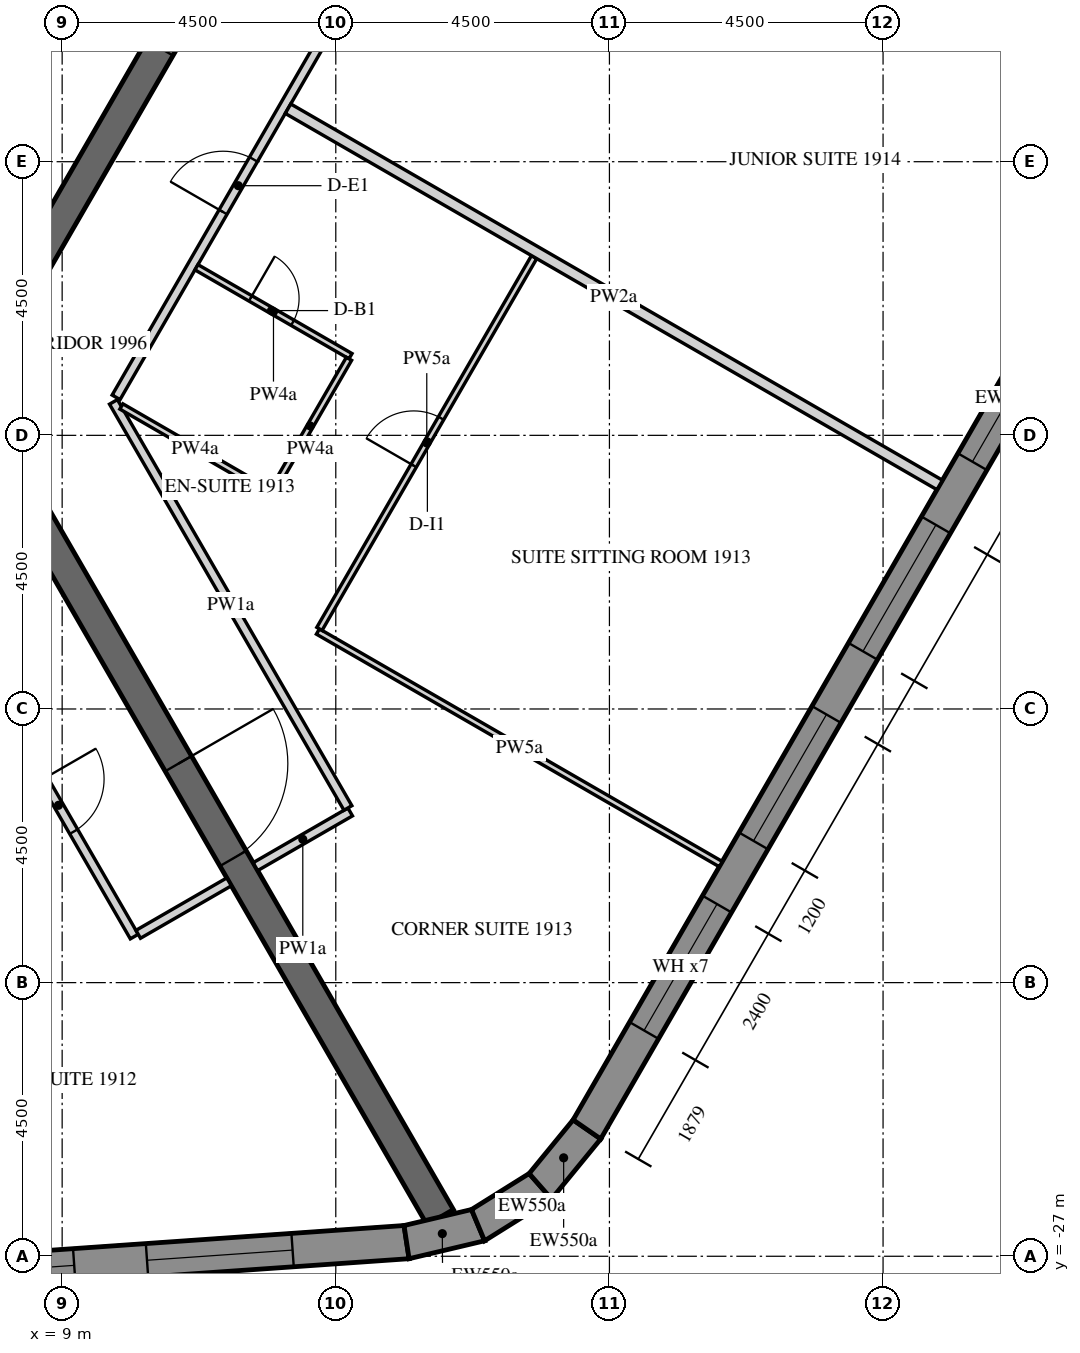
"""IFC4 building model, lengths in metres.
Left out: names, types, materials, properties, quantities, classifications, styles, units other than length and angle.
Written with IfcOpenShell. Run it as: python <this file> out.ifc"""

import sys

from ifc_helpers import new_model, si_unit, direction, frame, frame_2d, origin, place, context, subcontext, project, spatial, polyline, rectangle, outline, extrude, element, fill, save


model = new_model("IFC4")
c1 = context("Model", 3, precision=1e-05, world=origin(), true_north=direction((0.0, 1.0)))
c2 = subcontext(c1, "Body", "Model", "MODEL_VIEW")
j1 = project(units=[si_unit("LENGTHUNIT", "METRE"), si_unit("PLANEANGLEUNIT", "RADIAN")], contexts=[c1])
p1 = place(None, origin())
s1 = spatial("IfcSite", under=j1, at=p1, CompositionType="ELEMENT")
p2 = place(p1, origin())
s2 = spatial("IfcBuilding", under=s1, at=p2, CompositionType="ELEMENT")
p3 = place(p2, frame((0.0, 0.0, 246.3)))
s3 = spatial("IfcBuildingStorey", under=s2, at=p3, CompositionType="ELEMENT", Elevation=246.3)
p4 = place(p3, frame((-13.026, -28.704, -0.15), z_axis=(0.0, 0.0, 1.0), x_axis=(0.99756406806, 0.069756219185, 0.0)))
e1 = element("IfcWall", 1, at=p4, inside=s3, PredefinedType="SOLIDWALL", context=c2, shape_type="SweptSolid", body=[
    extrude(outline(polyline([(-0.026, -0.275), (27.78, -0.275), (27.735, 0.275), (0.026, 0.275), (-0.026, -0.275)])), origin(), (0.0, 0.0, 1.0), 3.75),
])
p5 = place(p4, frame((1.879, 0.0, 1.05)))
e2 = element("IfcOpeningElement", 2, at=p5, cuts=e1, PredefinedType="OPENING", context=c2, shape_type="SweptSolid", body=[
    extrude(rectangle(XDim=2.4, YDim=2.4, at=frame_2d((1.2, 1.2))), frame((0.0, 0.285, 0.0), z_axis=(0.0, -1.0, 0.0), x_axis=(1.0, 0.0, 0.0)), (0.0, 0.0, 1.0), 0.57),
])
p6 = place(p4, frame((5.479, 0.0, 1.05)))
e3 = element("IfcOpeningElement", 3, at=p6, cuts=e1, PredefinedType="OPENING", context=c2, shape_type="SweptSolid", body=[
    extrude(rectangle(XDim=2.4, YDim=2.4, at=frame_2d((1.2, 1.2))), frame((0.0, 0.285, 0.0), z_axis=(0.0, -1.0, 0.0), x_axis=(1.0, 0.0, 0.0)), (0.0, 0.0, 1.0), 0.57),
])
p7 = place(p4, frame((9.079, 0.0, 1.05)))
e4 = element("IfcOpeningElement", 4, at=p7, cuts=e1, PredefinedType="OPENING", context=c2, shape_type="SweptSolid", body=[
    extrude(rectangle(XDim=2.4, YDim=2.4, at=frame_2d((1.2, 1.2))), frame((0.0, 0.285, 0.0), z_axis=(0.0, -1.0, 0.0), x_axis=(1.0, 0.0, 0.0)), (0.0, 0.0, 1.0), 0.57),
])
p8 = place(p4, frame((12.679, 0.0, 1.05)))
e5 = element("IfcOpeningElement", 5, at=p8, cuts=e1, PredefinedType="OPENING", context=c2, shape_type="SweptSolid", body=[
    extrude(rectangle(XDim=2.4, YDim=2.4, at=frame_2d((1.2, 1.2))), frame((0.0, 0.285, 0.0), z_axis=(0.0, -1.0, 0.0), x_axis=(1.0, 0.0, 0.0)), (0.0, 0.0, 1.0), 0.57),
])
p9 = place(p4, frame((16.279, 0.0, 1.05)))
e6 = element("IfcOpeningElement", 6, at=p9, cuts=e1, PredefinedType="OPENING", context=c2, shape_type="SweptSolid", body=[
    extrude(rectangle(XDim=2.4, YDim=2.4, at=frame_2d((1.2, 1.2))), frame((0.0, 0.285, 0.0), z_axis=(0.0, -1.0, 0.0), x_axis=(1.0, 0.0, 0.0)), (0.0, 0.0, 1.0), 0.57),
])
p10 = place(p4, frame((19.879, 0.0, 1.05)))
e7 = element("IfcOpeningElement", 7, at=p10, cuts=e1, PredefinedType="OPENING", context=c2, shape_type="SweptSolid", body=[
    extrude(rectangle(XDim=2.4, YDim=2.4, at=frame_2d((1.2, 1.2))), frame((0.0, 0.285, 0.0), z_axis=(0.0, -1.0, 0.0), x_axis=(1.0, 0.0, 0.0)), (0.0, 0.0, 1.0), 0.57),
])
p11 = place(p4, frame((23.479, 0.0, 1.05)))
e8 = element("IfcOpeningElement", 8, at=p11, cuts=e1, PredefinedType="OPENING", context=c2, shape_type="SweptSolid", body=[
    extrude(rectangle(XDim=2.4, YDim=2.4, at=frame_2d((1.2, 1.2))), frame((0.0, 0.285, 0.0), z_axis=(0.0, -1.0, 0.0), x_axis=(1.0, 0.0, 0.0)), (0.0, 0.0, 1.0), 0.57),
])
p12 = place(p3, frame((14.664, -26.767, -0.15), z_axis=(0.0, 0.0, 1.0), x_axis=(0.973063591128, 0.230536868247, 0.0)))
e9 = element("IfcWall", 9, at=p12, inside=s3, PredefinedType="SOLIDWALL", context=c2, shape_type="SweptSolid", body=[
    extrude(outline(polyline([(-0.022, -0.275), (1.253, -0.275), (1.163, 0.275), (0.022, 0.275), (-0.022, -0.275)])), origin(), (0.0, 0.0, 1.0), 3.75),
])
p13 = place(p3, frame((15.84, -26.489, -0.15), z_axis=(0.0, 0.0, 1.0), x_axis=(0.848009655012, 0.52998077796, 0.0)))
e10 = element("IfcWall", 10, at=p13, inside=s3, PredefinedType="SOLIDWALL", context=c2, shape_type="SweptSolid", body=[
    extrude(outline(polyline([(-0.045, -0.275), (1.253, -0.275), (1.163, 0.275), (0.045, 0.275), (-0.045, -0.275)])), origin(), (0.0, 0.0, 1.0), 3.75),
])
p14 = place(p3, frame((16.864, -25.848, -0.15), z_axis=(0.0, 0.0, 1.0), x_axis=(0.633842757806, 0.773461930787, 0.0)))
e11 = element("IfcWall", 11, at=p14, inside=s3, PredefinedType="SOLIDWALL", context=c2, shape_type="SweptSolid", body=[
    extrude(outline(polyline([(-0.045, -0.275), (1.231, -0.275), (1.186, 0.275), (0.045, 0.275), (-0.045, -0.275)])), origin(), (0.0, 0.0, 1.0), 3.75),
])
p15 = place(p3, frame((17.63, -24.914, -0.15), z_axis=(0.0, 0.0, 1.0), x_axis=(0.499998569178, 0.866026229868, 0.0)))
e12 = element("IfcWall", 12, at=p15, inside=s3, PredefinedType="SOLIDWALL", context=c2, shape_type="SweptSolid", body=[
    extrude(outline(polyline([(-0.022, -0.275), (27.783, -0.275), (27.732, 0.275), (0.022, 0.275), (-0.022, -0.275)])), origin(), (0.0, 0.0, 1.0), 3.75),
])
p16 = place(p15, frame((1.879, 0.0, 1.05)))
e13 = element("IfcOpeningElement", 13, at=p16, cuts=e12, PredefinedType="OPENING", context=c2, shape_type="SweptSolid", body=[
    extrude(rectangle(XDim=2.4, YDim=2.4, at=frame_2d((1.2, 1.2))), frame((0.0, 0.285, 0.0), z_axis=(0.0, -1.0, 0.0), x_axis=(1.0, 0.0, 0.0)), (0.0, 0.0, 1.0), 0.57),
])
p17 = place(p15, frame((5.479, 0.0, 1.05)))
e14 = element("IfcOpeningElement", 14, at=p17, cuts=e12, PredefinedType="OPENING", context=c2, shape_type="SweptSolid", body=[
    extrude(rectangle(XDim=2.4, YDim=2.4, at=frame_2d((1.2, 1.2))), frame((0.0, 0.285, 0.0), z_axis=(0.0, -1.0, 0.0), x_axis=(1.0, 0.0, 0.0)), (0.0, 0.0, 1.0), 0.57),
])
p18 = place(p15, frame((9.079, 0.0, 1.05)))
e15 = element("IfcOpeningElement", 15, at=p18, cuts=e12, PredefinedType="OPENING", context=c2, shape_type="SweptSolid", body=[
    extrude(rectangle(XDim=2.4, YDim=2.4, at=frame_2d((1.2, 1.2))), frame((0.0, 0.285, 0.0), z_axis=(0.0, -1.0, 0.0), x_axis=(1.0, 0.0, 0.0)), (0.0, 0.0, 1.0), 0.57),
])
p19 = place(p15, frame((12.679, 0.0, 1.05)))
e16 = element("IfcOpeningElement", 16, at=p19, cuts=e12, PredefinedType="OPENING", context=c2, shape_type="SweptSolid", body=[
    extrude(rectangle(XDim=2.4, YDim=2.4, at=frame_2d((1.2, 1.2))), frame((0.0, 0.285, 0.0), z_axis=(0.0, -1.0, 0.0), x_axis=(1.0, 0.0, 0.0)), (0.0, 0.0, 1.0), 0.57),
])
p20 = place(p15, frame((16.279, 0.0, 1.05)))
e17 = element("IfcOpeningElement", 17, at=p20, cuts=e12, PredefinedType="OPENING", context=c2, shape_type="SweptSolid", body=[
    extrude(rectangle(XDim=2.4, YDim=2.4, at=frame_2d((1.2, 1.2))), frame((0.0, 0.285, 0.0), z_axis=(0.0, -1.0, 0.0), x_axis=(1.0, 0.0, 0.0)), (0.0, 0.0, 1.0), 0.57),
])
p21 = place(p15, frame((19.879, 0.0, 1.05)))
e18 = element("IfcOpeningElement", 18, at=p21, cuts=e12, PredefinedType="OPENING", context=c2, shape_type="SweptSolid", body=[
    extrude(rectangle(XDim=2.4, YDim=2.4, at=frame_2d((1.2, 1.2))), frame((0.0, 0.285, 0.0), z_axis=(0.0, -1.0, 0.0), x_axis=(1.0, 0.0, 0.0)), (0.0, 0.0, 1.0), 0.57),
])
p22 = place(p15, frame((23.479, 0.0, 1.05)))
e19 = element("IfcOpeningElement", 19, at=p22, cuts=e12, PredefinedType="OPENING", context=c2, shape_type="SweptSolid", body=[
    extrude(rectangle(XDim=2.4, YDim=2.4, at=frame_2d((1.2, 1.2))), frame((0.0, 0.285, 0.0), z_axis=(0.0, -1.0, 0.0), x_axis=(1.0, 0.0, 0.0)), (0.0, 0.0, 1.0), 0.57),
])
p23 = place(p3, frame((7.361, -12.75, -0.15), z_axis=(0.0, 0.0, 1.0), x_axis=(0.50000571537, 0.866022103989, 0.0)))
e20 = element("IfcWall", 20, at=p23, inside=s3, PredefinedType="SHEAR", context=c2, shape_type="SweptSolid", body=[
    extrude(outline(polyline([(-0.144, -0.25), (14.867, -0.25), (14.578, 0.25), (0.144, 0.25), (-0.144, -0.25)])), origin(), (0.0, 0.0, 1.0), 3.75),
])
p24 = place(p23, frame((6.49, 0.0, 0.15)))
e21 = element("IfcOpeningElement", 21, at=p24, cuts=e20, PredefinedType="OPENING", context=c2, shape_type="SweptSolid", body=[
    extrude(rectangle(XDim=1.8, YDim=2.4, at=frame_2d((0.9, 1.2))), frame((0.0, 0.26, 0.0), z_axis=(0.0, -1.0, 0.0), x_axis=(1.0, 0.0, 0.0)), (0.0, 0.0, 1.0), 0.52),
])
p25 = place(p3, frame((7.506, -13.0, -0.15), z_axis=(0.0, 0.0, 1.0), x_axis=(0.499988271576, -0.866032175087, 0.0)))
e22 = element("IfcWall", 22, at=p25, inside=s3, PredefinedType="SHEAR", context=c2, shape_type="SweptSolid", body=[
    extrude(rectangle(XDim=15.424, YDim=0.5, at=frame_2d((7.712, 0.0))), origin(), (0.0, 0.0, 1.0), 3.75),
])
p26 = place(p25, frame((6.812, 0.0, 0.15)))
e23 = element("IfcOpeningElement", 23, at=p26, cuts=e22, PredefinedType="OPENING", context=c2, shape_type="SweptSolid", body=[
    extrude(rectangle(XDim=1.8, YDim=2.4, at=frame_2d((0.9, 1.2))), frame((0.0, 0.26, 0.0), z_axis=(0.0, -1.0, 0.0), x_axis=(1.0, 0.0, 0.0)), (0.0, 0.0, 1.0), 0.52),
])
p27 = place(p3, frame((5.673, -9.825, -0.15), z_axis=(0.0, 0.0, 1.0), x_axis=(0.499995046907, 0.866028263435, 0.0)))
e24 = element("IfcWall", 24, at=p27, inside=s3, PredefinedType="SHEAR", context=c2, shape_type="SweptSolid", body=[
    extrude(outline(polyline([(-0.101, -0.175), (11.446, -0.175), (11.244, 0.175), (0.101, 0.175), (-0.101, -0.175)])), origin(), (0.0, 0.0, 1.0), 3.75),
])
p28 = place(p27, frame((4.801, 0.0, 0.15)))
e25 = element("IfcOpeningElement", 25, at=p28, cuts=e24, PredefinedType="OPENING", context=c2, shape_type="SweptSolid", body=[
    extrude(rectangle(XDim=1.8, YDim=2.4, at=frame_2d((0.9, 1.2))), frame((0.0, 0.185, 0.0), z_axis=(0.0, -1.0, 0.0), x_axis=(1.0, 0.0, 0.0)), (0.0, 0.0, 1.0), 0.37),
])
p29 = place(p3, frame((6.506, -15.368, 0.0), z_axis=(0.0, 0.0, 1.0), x_axis=(0.499995202058, -0.86602817386, 0.0)))
e26 = element("IfcWall", 26, at=p29, inside=s3, PredefinedType="PARTITIONING", context=c2, shape_type="SweptSolid", body=[
    extrude(rectangle(XDim=7.361, YDim=0.15, at=frame_2d((3.68, 0.0))), origin(), (0.0, 0.0, 1.0), 2.838),
])
p30 = place(p29, frame((4.368, 0.0, 0.0)))
e27 = element("IfcOpeningElement", 27, at=p30, cuts=e26, PredefinedType="OPENING", context=c2, shape_type="SweptSolid", body=[
    extrude(rectangle(XDim=1.0, YDim=2.1, at=frame_2d((0.5, 1.05))), frame((0.0, 0.085, 0.0), z_axis=(0.0, -1.0, 0.0), x_axis=(1.0, 0.0, 0.0)), (0.0, 0.0, 1.0), 0.17),
])
p31 = place(p3, frame((10.251, -21.705, 0.0), z_axis=(0.0, 0.0, 1.0), x_axis=(0.866013532718, 0.500020560727, 0.0)))
e28 = element("IfcWall", 28, at=p31, inside=s3, PredefinedType="PARTITIONING", context=c2, shape_type="SweptSolid", body=[
    extrude(rectangle(XDim=1.725, YDim=0.15, at=frame_2d((0.863, 0.0))), origin(), (0.0, 0.0, 1.0), 2.838),
])
p32 = place(p3, frame((12.178, -20.593, 0.0), z_axis=(0.0, 0.0, 1.0), x_axis=(0.866047807691, 0.499961193289, 0.0)))
e29 = element("IfcWall", 29, at=p32, inside=s3, PredefinedType="PARTITIONING", context=c2, shape_type="SweptSolid", body=[
    extrude(rectangle(XDim=1.8, YDim=0.15, at=frame_2d((0.9, 0.0))), origin(), (0.0, 0.0, 1.0), 2.838),
])
p33 = place(p3, frame((13.699, -19.628, 0.0), z_axis=(0.0, 0.0, 1.0), x_axis=(-0.499993780622, 0.866028994514, 0.0)))
e30 = element("IfcWall", 30, at=p33, inside=s3, PredefinedType="PARTITIONING", context=c2, shape_type="SweptSolid", body=[
    extrude(rectangle(XDim=7.711, YDim=0.15, at=frame_2d((3.855, 0.0))), origin(), (0.0, 0.0, 1.0), 2.838),
])
p34 = place(p3, frame((9.887, -12.875, 0.0), z_axis=(0.0, 0.0, 1.0), x_axis=(0.499998228944, 0.866026426302, 0.0)))
e31 = element("IfcWall", 31, at=p34, inside=s3, PredefinedType="PARTITIONING", context=c2, shape_type="SweptSolid", body=[
    extrude(rectangle(XDim=14.867, YDim=0.15, at=frame_2d((7.433, 0.0))), origin(), (0.0, 0.0, 1.0), 2.838),
])
p35 = place(p34, frame((3.519, 0.0, 0.0)))
e32 = element("IfcOpeningElement", 32, at=p35, cuts=e31, PredefinedType="OPENING", context=c2, shape_type="SweptSolid", body=[
    extrude(rectangle(XDim=1.0, YDim=2.1, at=frame_2d((0.5, 1.05))), frame((0.0, 0.085, 0.0), z_axis=(0.0, -1.0, 0.0), x_axis=(1.0, 0.0, 0.0)), (0.0, 0.0, 1.0), 0.17),
])
p36 = place(p34, frame((7.324, 0.0, 0.0)))
e33 = element("IfcOpeningElement", 33, at=p36, cuts=e31, PredefinedType="OPENING", context=c2, shape_type="SweptSolid", body=[
    extrude(rectangle(XDim=1.0, YDim=2.1, at=frame_2d((0.5, 1.05))), frame((0.0, 0.085, 0.0), z_axis=(0.0, -1.0, 0.0), x_axis=(1.0, 0.0, 0.0)), (0.0, 0.0, 1.0), 0.17),
])
p37 = place(p34, frame((13.717, 0.0, 0.0)))
e34 = element("IfcOpeningElement", 34, at=p37, cuts=e31, PredefinedType="OPENING", context=c2, shape_type="SweptSolid", body=[
    extrude(rectangle(XDim=1.0, YDim=2.1, at=frame_2d((0.5, 1.05))), frame((0.0, 0.085, 0.0), z_axis=(0.0, -1.0, 0.0), x_axis=(1.0, 0.0, 0.0)), (0.0, 0.0, 1.0), 0.17),
])
p38 = place(p3, frame((11.209, -10.736, 0.0), z_axis=(0.0, 0.0, 1.0), x_axis=(0.866046596414, -0.499963291492, 0.0)))
e35 = element("IfcWall", 35, at=p38, inside=s3, PredefinedType="PARTITIONING", context=c2, shape_type="SweptSolid", body=[
    extrude(rectangle(XDim=2.925, YDim=0.1, at=frame_2d((1.462, 0.0))), origin(), (0.0, 0.0, 1.0), 2.838),
])
p39 = place(p38, frame((1.025, 0.0, 0.0)))
e36 = element("IfcOpeningElement", 36, at=p39, cuts=e35, PredefinedType="OPENING", context=c2, shape_type="SweptSolid", body=[
    extrude(rectangle(XDim=0.8, YDim=2.1, at=frame_2d((0.4, 1.05))), frame((0.0, 0.06, 0.0), z_axis=(0.0, -1.0, 0.0), x_axis=(1.0, 0.0, 0.0)), (0.0, 0.0, 1.0), 0.12),
])
p40 = place(p3, frame((13.717, -12.242, 0.0), z_axis=(0.0, 0.0, 1.0), x_axis=(-0.499990435942, -0.866030925526, 0.0)))
e37 = element("IfcWall", 37, at=p40, inside=s3, PredefinedType="PARTITIONING", context=c2, shape_type="SweptSolid", body=[
    extrude(rectangle(XDim=2.55, YDim=0.1, at=frame_2d((1.275, 0.0))), origin(), (0.0, 0.0, 1.0), 2.838),
])
p41 = place(p3, frame((12.399, -14.425, 0.0), z_axis=(0.0, 0.0, 1.0), x_axis=(-0.866018616679, 0.500011755427, 0.0)))
e38 = element("IfcWall", 38, at=p41, inside=s3, PredefinedType="PARTITIONING", context=c2, shape_type="SweptSolid", body=[
    extrude(rectangle(XDim=2.8, YDim=0.1, at=frame_2d((1.4, 0.0))), origin(), (0.0, 0.0, 1.0), 2.838),
])
p42 = place(p3, frame((19.831, -20.551, 0.0), z_axis=(0.0, 0.0, 1.0), x_axis=(-0.866025084624, 0.500000552801, 0.0)))
e39 = element("IfcWall", 39, at=p42, inside=s3, PredefinedType="PARTITIONING", context=c2, shape_type="SweptSolid", body=[
    extrude(rectangle(XDim=7.65, YDim=0.1, at=frame_2d((3.825, 0.0))), origin(), (0.0, 0.0, 1.0), 2.838),
])
p43 = place(p3, frame((13.231, -16.683, 0.0), z_axis=(0.0, 0.0, 1.0), x_axis=(0.499995846692, 0.866027801685, 0.0)))
e40 = element("IfcWall", 40, at=p43, inside=s3, PredefinedType="PARTITIONING", context=c2, shape_type="SweptSolid", body=[
    extrude(rectangle(XDim=7.06, YDim=0.1, at=frame_2d((3.53, 0.0))), origin(), (0.0, 0.0, 1.0), 2.838),
])
p44 = place(p43, frame((3.1, 0.0, 0.0)))
e41 = element("IfcOpeningElement", 41, at=p44, cuts=e40, PredefinedType="OPENING", context=c2, shape_type="SweptSolid", body=[
    extrude(rectangle(XDim=0.9, YDim=2.1, at=frame_2d((0.45, 1.05))), frame((0.0, 0.06, 0.0), z_axis=(0.0, -1.0, 0.0), x_axis=(1.0, 0.0, 0.0)), (0.0, 0.0, 1.0), 0.12),
])
for number, where, z_axis, x_axis in (
    (42, (23.431, -14.316, 0.0), (0.0, 0.0, 1.0), (-0.866, 0.5, 0.0)),
    (43, (27.031, -8.08, 0.0), (0.0, 0.0, 1.0), (-0.866, 0.5, 0.0)),
):
    element("IfcWall", number, at=place(p3, frame(where, z_axis=z_axis, x_axis=x_axis)), inside=s3, PredefinedType="PARTITIONING", context=c2, shape_type="SweptSolid", body=[
        extrude(rectangle(XDim=12.375, YDim=0.18, at=frame_2d((6.188, 0.0))), origin(), (0.0, 0.0, 1.0), 2.838),
    ])
p45 = place(p10, frame((0.0, 0.205, 0.0)))
e44 = element("IfcWindow", 44, at=p45, inside=s3, PartitioningType="DOUBLE_PANEL_VERTICAL", PredefinedType="WINDOW", context=c2, shape_type="SweptSolid", body=[
    extrude(rectangle(XDim=2.4, YDim=2.4, at=frame_2d((1.2, 1.2))), frame((0.0, 0.03, 0.0), z_axis=(0.0, -1.0, 0.0), x_axis=(1.0, 0.0, 0.0)), (0.0, 0.0, 1.0), 0.06),
])
fill(e7, e44)
p46 = place(p11, frame((0.0, 0.205, 0.0)))
e45 = element("IfcWindow", 45, at=p46, inside=s3, PartitioningType="DOUBLE_PANEL_VERTICAL", PredefinedType="WINDOW", context=c2, shape_type="SweptSolid", body=[
    extrude(rectangle(XDim=2.4, YDim=2.4, at=frame_2d((1.2, 1.2))), frame((0.0, 0.03, 0.0), z_axis=(0.0, -1.0, 0.0), x_axis=(1.0, 0.0, 0.0)), (0.0, 0.0, 1.0), 0.06),
])
fill(e8, e45)
p47 = place(p16, frame((0.0, 0.205, 0.0)))
e46 = element("IfcWindow", 46, at=p47, inside=s3, PartitioningType="DOUBLE_PANEL_VERTICAL", PredefinedType="WINDOW", context=c2, shape_type="SweptSolid", body=[
    extrude(rectangle(XDim=2.4, YDim=2.4, at=frame_2d((1.2, 1.2))), frame((0.0, 0.03, 0.0), z_axis=(0.0, -1.0, 0.0), x_axis=(1.0, 0.0, 0.0)), (0.0, 0.0, 1.0), 0.06),
])
fill(e13, e46)
p48 = place(p17, frame((0.0, 0.205, 0.0)))
e47 = element("IfcWindow", 47, at=p48, inside=s3, PartitioningType="DOUBLE_PANEL_VERTICAL", PredefinedType="WINDOW", context=c2, shape_type="SweptSolid", body=[
    extrude(rectangle(XDim=2.4, YDim=2.4, at=frame_2d((1.2, 1.2))), frame((0.0, 0.03, 0.0), z_axis=(0.0, -1.0, 0.0), x_axis=(1.0, 0.0, 0.0)), (0.0, 0.0, 1.0), 0.06),
])
fill(e14, e47)
p49 = place(p18, frame((0.0, 0.205, 0.0)))
e48 = element("IfcWindow", 48, at=p49, inside=s3, PartitioningType="DOUBLE_PANEL_VERTICAL", PredefinedType="WINDOW", context=c2, shape_type="SweptSolid", body=[
    extrude(rectangle(XDim=2.4, YDim=2.4, at=frame_2d((1.2, 1.2))), frame((0.0, 0.03, 0.0), z_axis=(0.0, -1.0, 0.0), x_axis=(1.0, 0.0, 0.0)), (0.0, 0.0, 1.0), 0.06),
])
fill(e15, e48)
p50 = place(p19, frame((0.0, 0.205, 0.0)))
e49 = element("IfcWindow", 49, at=p50, inside=s3, PartitioningType="DOUBLE_PANEL_VERTICAL", PredefinedType="WINDOW", context=c2, shape_type="SweptSolid", body=[
    extrude(rectangle(XDim=2.4, YDim=2.4, at=frame_2d((1.2, 1.2))), frame((0.0, 0.03, 0.0), z_axis=(0.0, -1.0, 0.0), x_axis=(1.0, 0.0, 0.0)), (0.0, 0.0, 1.0), 0.06),
])
fill(e16, e49)
p51 = place(p26, origin())
e50 = element("IfcDoor", 50, at=p51, inside=s3, OperationType="DOUBLE_DOOR_SINGLE_SWING", PredefinedType="DOOR", context=c2, shape_type="SweptSolid", body=[
    extrude(rectangle(XDim=1.8, YDim=2.4, at=frame_2d((0.9, 1.2))), frame((0.0, 0.025, 0.0), z_axis=(0.0, -1.0, 0.0), x_axis=(1.0, 0.0, 0.0)), (0.0, 0.0, 1.0), 0.05),
])
fill(e23, e50)
p52 = place(p30, origin())
e51 = element("IfcDoor", 51, at=p52, inside=s3, OperationType="SINGLE_SWING_RIGHT", PredefinedType="DOOR", context=c2, shape_type="SweptSolid", body=[
    extrude(rectangle(XDim=1.0, YDim=2.1, at=frame_2d((0.5, 1.05))), frame((0.0, 0.025, 0.0), z_axis=(0.0, -1.0, 0.0), x_axis=(1.0, 0.0, 0.0)), (0.0, 0.0, 1.0), 0.05),
])
fill(e27, e51)
p53 = place(p35, origin())
e52 = element("IfcDoor", 52, at=p53, inside=s3, OperationType="SINGLE_SWING_RIGHT", PredefinedType="DOOR", context=c2, shape_type="SweptSolid", body=[
    extrude(rectangle(XDim=1.0, YDim=2.1, at=frame_2d((0.5, 1.05))), frame((0.0, 0.025, 0.0), z_axis=(0.0, -1.0, 0.0), x_axis=(1.0, 0.0, 0.0)), (0.0, 0.0, 1.0), 0.05),
])
fill(e32, e52)
p54 = place(p39, origin())
e53 = element("IfcDoor", 53, at=p54, inside=s3, OperationType="SINGLE_SWING_RIGHT", PredefinedType="DOOR", context=c2, shape_type="SweptSolid", body=[
    extrude(rectangle(XDim=0.8, YDim=2.1, at=frame_2d((0.4, 1.05))), frame((0.0, 0.025, 0.0), z_axis=(0.0, -1.0, 0.0), x_axis=(1.0, 0.0, 0.0)), (0.0, 0.0, 1.0), 0.05),
])
fill(e36, e53)
p55 = place(p44, origin())
e54 = element("IfcDoor", 54, at=p55, inside=s3, OperationType="SINGLE_SWING_LEFT", PredefinedType="DOOR", context=c2, shape_type="SweptSolid", body=[
    extrude(rectangle(XDim=0.9, YDim=2.1, at=frame_2d((0.45, 1.05))), frame((0.0, 0.025, 0.0), z_axis=(0.0, -1.0, 0.0), x_axis=(1.0, 0.0, 0.0)), (0.0, 0.0, 1.0), 0.05),
])
fill(e41, e54)
save(model, sys.argv[1])
